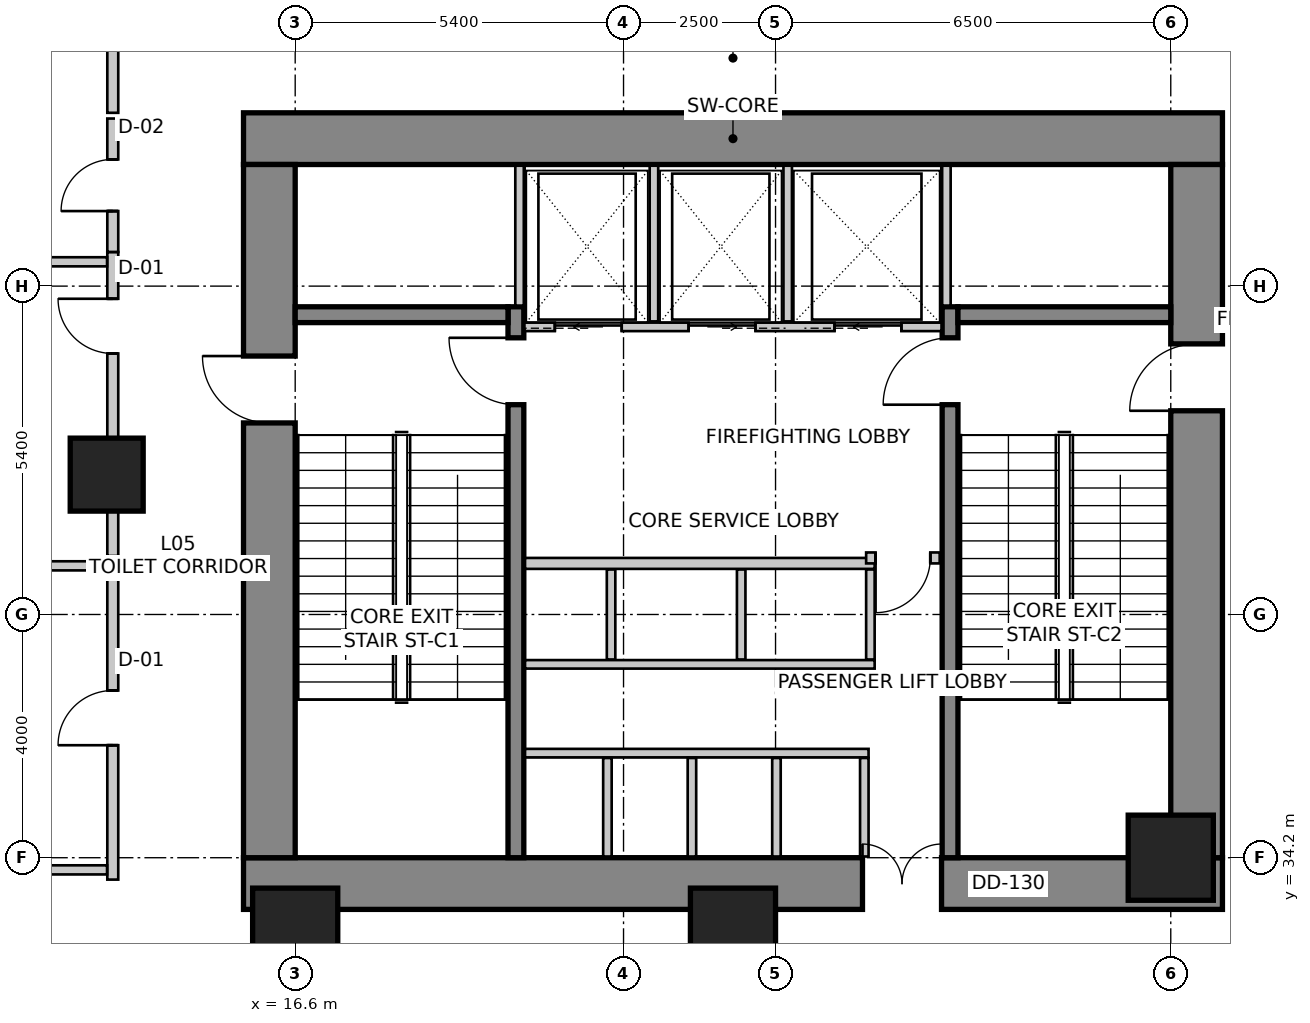
"""IFC4 building model, lengths in metres.
Left out: names, types, materials, properties, quantities, classifications, styles, units other than length and angle.
Written with IfcOpenShell. Run it as: python <this file> out.ifc"""

import sys

from ifc_helpers import new_model, si_unit, direction, frame, frame_2d, origin, origin_2d, place, context, subcontext, project, spatial, rectangle, extrude, source, transform, mapped, element, fill, save


model = new_model("IFC4")
c1 = context("Model", 3, precision=1e-05, world=origin(), true_north=direction((0.0, 1.0)))
c2 = subcontext(c1, "Body", "Model", "MODEL_VIEW")
j1 = project(units=[si_unit("LENGTHUNIT", "METRE"), si_unit("PLANEANGLEUNIT", "RADIAN")], contexts=[c1])
p1 = place(None, origin())
s1 = spatial("IfcSite", under=j1, at=p1, CompositionType="ELEMENT")
p2 = place(p1, origin())
s2 = spatial("IfcBuilding", under=s1, at=p2, CompositionType="ELEMENT")
p3 = place(p2, frame((0.0, 0.0, 21.6)))
s3 = spatial("IfcBuildingStorey", under=s2, at=p3, CompositionType="ELEMENT", Elevation=21.6)
p4 = place(p3, frame((15.75, 46.025, 0.0), z_axis=(0.0, 0.0, 1.0), x_axis=(1.0, 0.0, 0.0)))
e1 = element("IfcWall", 1, at=p4, inside=s3, PredefinedType="SHEAR", context=c2, shape_type="SweptSolid", body=[
    extrude(rectangle(XDim=16.1, YDim=0.85, at=frame_2d((8.05, 0.0))), origin(), (0.0, 0.0, 1.0), 5.4),
])
p5 = place(p3, frame((15.75, 33.775, 0.0), z_axis=(0.0, 0.0, 1.0), x_axis=(1.0, 0.0, 0.0)))
e2 = element("IfcWall", 2, at=p5, inside=s3, PredefinedType="SHEAR", context=c2, shape_type="SweptSolid", body=[
    extrude(rectangle(XDim=16.1, YDim=0.85, at=frame_2d((8.05, 0.0))), origin(), (0.0, 0.0, 1.0), 5.4),
])
m1 = source(origin(), c2, "Body", "SweptSolid", [
    extrude(rectangle(XDim=1.3, YDim=2.15, at=frame_2d((0.65, 1.075))), frame((0.0, 0.435, 0.0), z_axis=(0.0, -1.0, 0.0), x_axis=(1.0, 0.0, 0.0)), (0.0, 0.0, 1.0), 0.87),
])
p6 = place(p5, frame((10.18, 0.0, 0.0)))
e3 = element("IfcOpeningElement", 3, at=p6, cuts=e2, PredefinedType="OPENING", context=c2, shape_type="MappedRepresentation", body=[
    mapped(m1, transform((0.0, 0.0, 0.0), scale=1.0)),
])
p7 = place(p3, frame((16.175, 34.2, 0.0), z_axis=(0.0, 0.0, 1.0), x_axis=(0.0, 1.0, 0.0)))
e4 = element("IfcWall", 4, at=p7, inside=s3, PredefinedType="SHEAR", context=c2, shape_type="SweptSolid", body=[
    extrude(rectangle(XDim=11.4, YDim=0.85, at=frame_2d((5.7, 0.0))), origin(), (0.0, 0.0, 1.0), 5.4),
])
m2 = source(origin(), c2, "Body", "SweptSolid", [
    extrude(rectangle(XDim=1.1, YDim=2.15, at=frame_2d((0.55, 1.075))), frame((0.0, 0.435, 0.0), z_axis=(0.0, -1.0, 0.0), x_axis=(1.0, 0.0, 0.0)), (0.0, 0.0, 1.0), 0.87),
])
p8 = place(p7, frame((7.15, 0.0, 0.0)))
e5 = element("IfcOpeningElement", 5, at=p8, cuts=e4, PredefinedType="OPENING", context=c2, shape_type="MappedRepresentation", body=[
    mapped(m2, transform((0.0, 0.0, 0.0), scale=1.0)),
])
p9 = place(p3, frame((31.425, 34.2, 0.0), z_axis=(0.0, 0.0, 1.0), x_axis=(0.0, 1.0, 0.0)))
e6 = element("IfcWall", 6, at=p9, inside=s3, PredefinedType="SHEAR", context=c2, shape_type="SweptSolid", body=[
    extrude(rectangle(XDim=11.4, YDim=0.85, at=frame_2d((5.7, 0.0))), origin(), (0.0, 0.0, 1.0), 5.4),
])
p10 = place(p9, frame((7.35, 0.0, 0.0)))
e7 = element("IfcOpeningElement", 7, at=p10, cuts=e6, PredefinedType="OPENING", context=c2, shape_type="MappedRepresentation", body=[
    mapped(m2, transform((0.0, 0.0, 0.0), scale=1.0)),
])
p11 = place(p3, frame((20.23, 34.2, 0.0), z_axis=(0.0, 0.0, 1.0), x_axis=(0.0, 1.0, 0.0)))
e8 = element("IfcWall", 8, at=p11, inside=s3, PredefinedType="SHEAR", context=c2, shape_type="SweptSolid", body=[
    extrude(rectangle(XDim=9.06, YDim=0.26, at=frame_2d((4.53, 0.0))), origin(), (0.0, 0.0, 1.0), 5.4),
])
m3 = source(origin(), c2, "Body", "SweptSolid", [
    extrude(rectangle(XDim=1.1, YDim=2.15, at=frame_2d((0.55, 1.075))), frame((0.0, 0.14, 0.0), z_axis=(0.0, -1.0, 0.0), x_axis=(1.0, 0.0, 0.0)), (0.0, 0.0, 1.0), 0.28),
])
p12 = place(p11, frame((7.45, 0.0, 0.0)))
e9 = element("IfcOpeningElement", 9, at=p12, cuts=e8, PredefinedType="OPENING", context=c2, shape_type="MappedRepresentation", body=[
    mapped(m3, transform((0.0, 0.0, 0.0), scale=1.0)),
])
p13 = place(p3, frame((27.37, 34.2, 0.0), z_axis=(0.0, 0.0, 1.0), x_axis=(0.0, 1.0, 0.0)))
e10 = element("IfcWall", 10, at=p13, inside=s3, PredefinedType="SHEAR", context=c2, shape_type="SweptSolid", body=[
    extrude(rectangle(XDim=9.06, YDim=0.26, at=frame_2d((4.53, 0.0))), origin(), (0.0, 0.0, 1.0), 5.4),
])
p14 = place(p13, frame((7.45, 0.0, 0.0)))
e11 = element("IfcOpeningElement", 11, at=p14, cuts=e10, PredefinedType="OPENING", context=c2, shape_type="MappedRepresentation", body=[
    mapped(m3, transform((0.0, 0.0, 0.0), scale=1.0)),
])
for number, where, z_axis, x_axis in (
    (12, (16.6, 43.13, 0.0), (0.0, 0.0, 1.0), (1.0, 0.0, 0.0)),
    (13, (27.5, 43.13, 0.0), (0.0, 0.0, 1.0), (1.0, 0.0, 0.0)),
):
    element("IfcWall", number, at=place(p3, frame(where, z_axis=z_axis, x_axis=x_axis)), inside=s3, PredefinedType="SHEAR", context=c2, shape_type="SweptSolid", body=[
        extrude(rectangle(XDim=3.5, YDim=0.26, at=frame_2d((1.75, 0.0))), origin(), (0.0, 0.0, 1.0), 5.4),
    ])
m4 = source(origin(), c2, "Body", "SweptSolid", [
    extrude(rectangle(XDim=1.4, YDim=1.4, at=origin_2d()), origin(), (0.0, 0.0, 1.0), 5.4),
])
for number, where, z_axis, x_axis in (
    (14, (16.6, 33.0, 0.0), (0.0, 0.0, 1.0), (1.0, 0.0, 0.0)),
    (15, (23.8, 33.0, 0.0), (0.0, 0.0, 1.0), (1.0, 0.0, 0.0)),
    (16, (31.0, 34.2, 0.0), (0.0, 0.0, 1.0), (1.0, 0.0, 0.0)),
):
    element("IfcColumn", number, at=place(p3, frame(where, z_axis=z_axis, x_axis=x_axis)), inside=s3, PredefinedType="COLUMN", context=c2, shape_type="MappedRepresentation", body=[
        mapped(m4, transform((0.0, 0.0, 0.0), scale=1.0)),
    ])
m5 = source(origin(), c2, "Body", "SweptSolid", [
    extrude(rectangle(XDim=1.2, YDim=1.2, at=origin_2d()), origin(), (0.0, 0.0, 1.0), 5.4),
])
p15 = place(p3, frame((13.5, 40.5, 0.0), z_axis=(0.0, 0.0, 1.0), x_axis=(1.0, 0.0, 0.0)))
e17 = element("IfcColumn", 17, at=p15, inside=s3, PredefinedType="COLUMN", context=c2, shape_type="MappedRepresentation", body=[
    mapped(m5, transform((0.0, 0.0, 0.0), scale=1.0)),
])
p16 = place(p3, frame((20.37, 42.93, 0.0), z_axis=(0.0, 0.0, 1.0), x_axis=(1.0, 0.0, 0.0)))
e18 = element("IfcWall", 18, at=p16, inside=s3, PredefinedType="SOLIDWALL", context=c2, shape_type="SweptSolid", body=[
    extrude(rectangle(XDim=6.86, YDim=0.14, at=frame_2d((3.43, 0.0))), origin(), (0.0, 0.0, 1.0), 5.05),
])
m6 = source(origin(), c2, "Body", "SweptSolid", [
    extrude(rectangle(XDim=1.1, YDim=2.15, at=frame_2d((0.55, 1.075))), frame((0.0, 0.08, 0.0), z_axis=(0.0, -1.0, 0.0), x_axis=(1.0, 0.0, 0.0)), (0.0, 0.0, 1.0), 0.16),
])
p17 = place(p16, frame((0.5, 0.0, 0.0)))
e19 = element("IfcOpeningElement", 19, at=p17, cuts=e18, PredefinedType="OPENING", context=c2, shape_type="MappedRepresentation", body=[
    mapped(m6, transform((0.0, 0.0, 0.0), scale=1.0)),
])
p18 = place(p16, frame((2.7, 0.0, 0.0)))
e20 = element("IfcOpeningElement", 20, at=p18, cuts=e18, PredefinedType="OPENING", context=c2, shape_type="MappedRepresentation", body=[
    mapped(m6, transform((0.0, 0.0, 0.0), scale=1.0)),
])
p19 = place(p16, frame((5.1, 0.0, 0.0)))
e21 = element("IfcOpeningElement", 21, at=p19, cuts=e18, PredefinedType="OPENING", context=c2, shape_type="MappedRepresentation", body=[
    mapped(m6, transform((0.0, 0.0, 0.0), scale=1.0)),
])
for number, where, z_axis, x_axis in (
    (22, (20.29, 43.28, 0.0), (0.0, 0.0, 1.0), (0.0, 1.0, 0.0)),
    (23, (27.31, 43.28, 0.0), (0.0, 0.0, 1.0), (0.0, 1.0, 0.0)),
):
    element("IfcWall", number, at=place(p3, frame(where, z_axis=z_axis, x_axis=x_axis)), inside=s3, PredefinedType="SOLIDWALL", context=c2, shape_type="SweptSolid", body=[
        extrude(rectangle(XDim=2.3, YDim=0.14, at=frame_2d((1.15, 0.0))), origin(), (0.0, 0.0, 1.0), 5.05),
    ])
for number, where, z_axis, x_axis in (
    (24, (22.5, 43.02, 0.0), (0.0, 0.0, 1.0), (0.0, 1.0, 0.0)),
    (25, (24.7, 43.02, 0.0), (0.0, 0.0, 1.0), (0.0, 1.0, 0.0)),
):
    element("IfcWall", number, at=place(p3, frame(where, z_axis=z_axis, x_axis=x_axis)), inside=s3, PredefinedType="SOLIDWALL", context=c2, shape_type="SweptSolid", body=[
        extrude(rectangle(XDim=2.56, YDim=0.14, at=frame_2d((1.28, 0.0))), origin(), (0.0, 0.0, 1.0), 5.05),
    ])
p20 = place(p3, frame((20.38, 35.92, 0.0), z_axis=(0.0, 0.0, 1.0), x_axis=(1.0, 0.0, 0.0)))
e26 = element("IfcWall", 26, at=p20, inside=s3, PredefinedType="SOLIDWALL", context=c2, shape_type="SweptSolid", body=[
    extrude(rectangle(XDim=5.65, YDim=0.14, at=frame_2d((2.825, 0.0))), origin(), (0.0, 0.0, 1.0), 5.05),
])
for number, where, z_axis, x_axis in (
    (27, (25.96, 34.22, 0.0), (0.0, 0.0, 1.0), (0.0, 1.0, 0.0)),
    (28, (21.735, 34.22, 0.0), (0.0, 0.0, 1.0), (0.0, 1.0, 0.0)),
    (29, (23.125, 34.22, 0.0), (0.0, 0.0, 1.0), (0.0, 1.0, 0.0)),
    (30, (24.515, 34.22, 0.0), (0.0, 0.0, 1.0), (0.0, 1.0, 0.0)),
):
    element("IfcWall", number, at=place(p3, frame(where, z_axis=z_axis, x_axis=x_axis)), inside=s3, PredefinedType="SOLIDWALL", context=c2, shape_type="SweptSolid", body=[
        extrude(rectangle(XDim=1.62, YDim=0.14, at=frame_2d((0.81, 0.0))), origin(), (0.0, 0.0, 1.0), 5.05),
    ])
p21 = place(p3, frame((20.38, 37.38, 0.0), z_axis=(0.0, 0.0, 1.0), x_axis=(1.0, 0.0, 0.0)))
e31 = element("IfcWall", 31, at=p21, inside=s3, PredefinedType="SOLIDWALL", context=c2, shape_type="SweptSolid", body=[
    extrude(rectangle(XDim=5.75, YDim=0.14, at=frame_2d((2.875, 0.0))), origin(), (0.0, 0.0, 1.0), 5.05),
])
p22 = place(p3, frame((20.38, 39.04, 0.0), z_axis=(0.0, 0.0, 1.0), x_axis=(1.0, 0.0, 0.0)))
e32 = element("IfcWall", 32, at=p22, inside=s3, PredefinedType="SOLIDWALL", context=c2, shape_type="SweptSolid", body=[
    extrude(rectangle(XDim=5.75, YDim=0.18, at=frame_2d((2.875, 0.0))), origin(), (0.0, 0.0, 1.0), 5.05),
])
for number, where, z_axis, x_axis in (
    (33, (26.06, 37.46, 0.0), (0.0, 0.0, 1.0), (0.0, 1.0, 0.0)),
    (34, (21.795, 37.46, 0.0), (0.0, 0.0, 1.0), (0.0, 1.0, 0.0)),
    (35, (23.935, 37.46, 0.0), (0.0, 0.0, 1.0), (0.0, 1.0, 0.0)),
):
    element("IfcWall", number, at=place(p3, frame(where, z_axis=z_axis, x_axis=x_axis)), inside=s3, PredefinedType="SOLIDWALL", context=c2, shape_type="SweptSolid", body=[
        extrude(rectangle(XDim=1.48, YDim=0.14, at=frame_2d((0.74, 0.0))), origin(), (0.0, 0.0, 1.0), 5.05),
    ])
p23 = place(p3, frame((27.2, 39.13, 0.0), z_axis=(0.0, 0.0, 1.0), x_axis=(-1.0, 0.0, 0.0)))
e36 = element("IfcWall", 36, at=p23, inside=s3, PredefinedType="PARTITIONING", context=c2, shape_type="SweptSolid", body=[
    extrude(rectangle(XDim=1.21, YDim=0.18, at=frame_2d((0.605, 0.0))), origin(), (0.0, 0.0, 1.0), 5.05),
])
m7 = source(origin(), c2, "Body", "SweptSolid", [
    extrude(rectangle(XDim=0.9, YDim=2.15, at=frame_2d((0.45, 1.075))), frame((0.0, 0.1, 0.0), z_axis=(0.0, -1.0, 0.0), x_axis=(1.0, 0.0, 0.0)), (0.0, 0.0, 1.0), 0.2),
])
p24 = place(p23, frame((0.155, 0.0, 0.0)))
e37 = element("IfcOpeningElement", 37, at=p24, cuts=e36, PredefinedType="OPENING", context=c2, shape_type="MappedRepresentation", body=[
    mapped(m7, transform((0.0, 0.0, 0.0), scale=1.0)),
])
p25 = place(p3, frame((13.6, 46.45, 0.0), z_axis=(0.0, 0.0, 1.0), x_axis=(0.0, 1.0, 0.0)))
e38 = element("IfcWall", 38, at=p25, inside=s3, PredefinedType="PARTITIONING", context=c2, shape_type="SweptSolid", body=[
    extrude(rectangle(XDim=1.71, YDim=0.18, at=frame_2d((0.855, 0.0))), origin(), (0.0, 0.0, 1.0), 5.05),
])
p26 = place(p3, frame((13.6, 33.84, 0.0), z_axis=(0.0, 0.0, 1.0), x_axis=(0.0, 1.0, 0.0)))
e39 = element("IfcWall", 39, at=p26, inside=s3, PredefinedType="PARTITIONING", context=c2, shape_type="SweptSolid", body=[
    extrude(rectangle(XDim=5.32, YDim=0.18, at=frame_2d((2.66, 0.0))), origin(), (0.0, 0.0, 1.0), 5.05),
])
p27 = place(p26, frame((2.21, 0.0, 0.0)))
e40 = element("IfcOpeningElement", 40, at=p27, cuts=e39, PredefinedType="OPENING", context=c2, shape_type="MappedRepresentation", body=[
    mapped(m7, transform((0.0, 0.0, 0.0), scale=1.0)),
])
p28 = place(p3, frame((13.6, 39.162, 0.0), z_axis=(0.0, 0.0, 1.0), x_axis=(0.0, 1.0, 0.0)))
e41 = element("IfcWall", 41, at=p28, inside=s3, PredefinedType="PARTITIONING", context=c2, shape_type="SweptSolid", body=[
    extrude(rectangle(XDim=4.998, YDim=0.18, at=frame_2d((2.499, 0.0))), origin(), (0.0, 0.0, 1.0), 3.842),
])
p29 = place(p28, frame((3.33, 0.0, 0.0)))
e42 = element("IfcOpeningElement", 42, at=p29, cuts=e41, PredefinedType="OPENING", context=c2, shape_type="MappedRepresentation", body=[
    mapped(m7, transform((0.0, 0.0, 0.0), scale=1.0)),
])
p30 = place(p3, frame((13.6, 44.162, 0.0), z_axis=(0.0, 0.0, 1.0), x_axis=(0.0, 1.0, 0.0)))
e43 = element("IfcWall", 43, at=p30, inside=s3, PredefinedType="PARTITIONING", context=c2, shape_type="SweptSolid", body=[
    extrude(rectangle(XDim=2.194, YDim=0.18, at=frame_2d((1.097, 0.0))), origin(), (0.0, 0.0, 1.0), 5.05),
])
m8 = source(origin(), c2, "Body", "SweptSolid", [
    extrude(rectangle(XDim=0.85, YDim=2.15, at=frame_2d((0.425, 1.075))), frame((0.0, 0.1, 0.0), z_axis=(0.0, -1.0, 0.0), x_axis=(1.0, 0.0, 0.0)), (0.0, 0.0, 1.0), 0.2),
])
p31 = place(p30, frame((0.672, 0.0, 0.0)))
e44 = element("IfcOpeningElement", 44, at=p31, cuts=e43, PredefinedType="OPENING", context=c2, shape_type="MappedRepresentation", body=[
    mapped(m8, transform((0.0, 0.0, 0.0), scale=1.0)),
])
for number, where, z_axis, x_axis in (
    (45, (5.8, 39.0, 0.0), (0.0, 0.0, 1.0), (1.0, 0.0, 0.0)),
    (46, (13.506, 34.0, 0.0), (0.0, 0.0, 1.0), (-1.0, 0.0, 0.0)),
):
    element("IfcWall", number, at=place(p3, frame(where, z_axis=z_axis, x_axis=x_axis)), inside=s3, PredefinedType="PARTITIONING", context=c2, shape_type="SweptSolid", body=[
        extrude(rectangle(XDim=7.706, YDim=0.15, at=frame_2d((3.853, 0.0))), origin(), (0.0, 0.0, 1.0), 3.842),
    ])
p32 = place(p3, frame((8.64, 44.0, 0.0), z_axis=(0.0, 0.0, 1.0), x_axis=(1.0, 0.0, 0.0)))
e47 = element("IfcWall", 47, at=p32, inside=s3, PredefinedType="PARTITIONING", context=c2, shape_type="SweptSolid", body=[
    extrude(rectangle(XDim=4.866, YDim=0.15, at=frame_2d((2.433, 0.0))), origin(), (0.0, 0.0, 1.0), 5.05),
])
for number, where, z_axis, x_axis in (
    (48, (17.1, 33.362, 0.0), (0.0, 0.0, 1.0), (0.0, -1.0, 0.0)),
    (49, (16.1, 14.49, 0.0), (0.0, 0.0, 1.0), (0.0, 1.0, 0.0)),
):
    element("IfcWall", number, at=place(p3, frame(where, z_axis=z_axis, x_axis=x_axis)), inside=s3, PredefinedType="SOLIDWALL", context=c2, shape_type="SweptSolid", body=[
        extrude(rectangle(XDim=18.872, YDim=0.2, at=frame_2d((9.436, 0.0))), origin(), (0.0, 0.0, 1.0), 3.042),
    ])
p33 = place(p3, frame((24.3, 33.412, 0.0), z_axis=(0.0, 0.0, 1.0), x_axis=(0.0, -1.0, 0.0)))
e50 = element("IfcWall", 50, at=p33, inside=s3, PredefinedType="SOLIDWALL", context=c2, shape_type="SweptSolid", body=[
    extrude(rectangle(XDim=3.678, YDim=0.2, at=frame_2d((1.839, 0.0))), origin(), (0.0, 0.0, 1.0), 3.042),
])
p34 = place(p3, frame((23.3, 14.49, 0.0), z_axis=(0.0, 0.0, 1.0), x_axis=(0.0, 1.0, 0.0)))
e51 = element("IfcWall", 51, at=p34, inside=s3, PredefinedType="SOLIDWALL", context=c2, shape_type="SweptSolid", body=[
    extrude(rectangle(XDim=18.872, YDim=0.2, at=frame_2d((9.436, 0.0))), origin(), (0.0, 0.0, 1.0), 3.042),
])
m9 = source(origin(), c2, "Body", "SweptSolid", [
    extrude(rectangle(XDim=1.1, YDim=2.15, at=frame_2d((0.55, 1.075))), frame((0.0, 0.025, 0.0), z_axis=(0.0, -1.0, 0.0), x_axis=(1.0, 0.0, 0.0)), (0.0, 0.0, 1.0), 0.05),
])
p35 = place(p17, origin())
e52 = element("IfcDoor", 52, at=p35, inside=s3, OperationType="SLIDING_TO_LEFT", PredefinedType="DOOR", context=c2, shape_type="MappedRepresentation", body=[
    mapped(m9, transform((0.0, 0.0, 0.0), scale=1.0)),
])
fill(e19, e52)
p36 = place(p18, origin())
e53 = element("IfcDoor", 53, at=p36, inside=s3, OperationType="SLIDING_TO_RIGHT", PredefinedType="DOOR", context=c2, shape_type="MappedRepresentation", body=[
    mapped(m9, transform((0.0, 0.0, 0.0), scale=1.0)),
])
fill(e20, e53)
m10 = source(origin(), c2, "Body", "SweptSolid", [
    extrude(rectangle(XDim=1.1, YDim=2.15, at=frame_2d((0.55, 1.075))), frame((0.0, 0.025, 0.0), z_axis=(0.0, -1.0, 0.0), x_axis=(1.0, 0.0, 0.0)), (0.0, 0.0, 1.0), 0.05),
])
p37 = place(p19, origin())
e54 = element("IfcDoor", 54, at=p37, inside=s3, OperationType="SLIDING_TO_LEFT", PredefinedType="DOOR", context=c2, shape_type="MappedRepresentation", body=[
    mapped(m10, transform((0.0, 0.0, 0.0), scale=1.0)),
])
fill(e21, e54)
m11 = source(origin(), c2, "Body", "SweptSolid", [
    extrude(rectangle(XDim=1.1, YDim=2.15, at=frame_2d((0.55, 1.075))), frame((0.0, 0.025, 0.0), z_axis=(0.0, -1.0, 0.0), x_axis=(1.0, 0.0, 0.0)), (0.0, 0.0, 1.0), 0.05),
])
p38 = place(p12, origin())
e55 = element("IfcDoor", 55, at=p38, inside=s3, OperationType="SINGLE_SWING_RIGHT", PredefinedType="DOOR", context=c2, shape_type="MappedRepresentation", body=[
    mapped(m11, transform((0.0, 0.0, 0.0), scale=1.0)),
])
fill(e9, e55)
p39 = place(p14, origin())
e56 = element("IfcDoor", 56, at=p39, inside=s3, OperationType="SINGLE_SWING_LEFT", PredefinedType="DOOR", context=c2, shape_type="MappedRepresentation", body=[
    mapped(m11, transform((0.0, 0.0, 0.0), scale=1.0)),
])
fill(e11, e56)
p40 = place(p8, origin())
e57 = element("IfcDoor", 57, at=p40, inside=s3, OperationType="SINGLE_SWING_RIGHT", PredefinedType="DOOR", context=c2, shape_type="MappedRepresentation", body=[
    mapped(m11, transform((0.0, 0.0, 0.0), scale=1.0)),
])
fill(e5, e57)
p41 = place(p10, origin())
e58 = element("IfcDoor", 58, at=p41, inside=s3, OperationType="SINGLE_SWING_LEFT", PredefinedType="DOOR", context=c2, shape_type="MappedRepresentation", body=[
    mapped(m11, transform((0.0, 0.0, 0.0), scale=1.0)),
])
fill(e7, e58)
m12 = source(origin(), c2, "Body", "SweptSolid", [
    extrude(rectangle(XDim=1.3, YDim=2.15, at=frame_2d((0.65, 1.075))), frame((0.0, 0.025, 0.0), z_axis=(0.0, -1.0, 0.0), x_axis=(1.0, 0.0, 0.0)), (0.0, 0.0, 1.0), 0.05),
])
p42 = place(p6, origin())
e59 = element("IfcDoor", 59, at=p42, inside=s3, OperationType="DOUBLE_DOOR_SINGLE_SWING", PredefinedType="DOOR", context=c2, shape_type="MappedRepresentation", body=[
    mapped(m12, transform((0.0, 0.0, 0.0), scale=1.0)),
])
fill(e3, e59)
m13 = source(origin(), c2, "Body", "SweptSolid", [
    extrude(rectangle(XDim=0.9, YDim=2.15, at=frame_2d((0.45, 1.075))), frame((0.0, 0.025, 0.0), z_axis=(0.0, -1.0, 0.0), x_axis=(1.0, 0.0, 0.0)), (0.0, 0.0, 1.0), 0.05),
])
p43 = place(p24, origin())
e60 = element("IfcDoor", 60, at=p43, inside=s3, OperationType="SINGLE_SWING_RIGHT", PredefinedType="DOOR", context=c2, shape_type="MappedRepresentation", body=[
    mapped(m13, transform((0.0, 0.0, 0.0), scale=1.0)),
])
fill(e37, e60)
m14 = source(origin(), c2, "Body", "SweptSolid", [
    extrude(rectangle(XDim=0.9, YDim=2.15, at=frame_2d((0.45, 1.075))), frame((0.0, 0.025, 0.0), z_axis=(0.0, -1.0, 0.0), x_axis=(1.0, 0.0, 0.0)), (0.0, 0.0, 1.0), 0.05),
])
p44 = place(p27, origin())
e61 = element("IfcDoor", 61, at=p44, inside=s3, OperationType="SINGLE_SWING_LEFT", PredefinedType="DOOR", context=c2, shape_type="MappedRepresentation", body=[
    mapped(m14, transform((0.0, 0.0, 0.0), scale=1.0)),
])
fill(e40, e61)
p45 = place(p29, origin())
e62 = element("IfcDoor", 62, at=p45, inside=s3, OperationType="SINGLE_SWING_RIGHT", PredefinedType="DOOR", context=c2, shape_type="MappedRepresentation", body=[
    mapped(m14, transform((0.0, 0.0, 0.0), scale=1.0)),
])
fill(e42, e62)
m15 = source(origin(), c2, "Body", "SweptSolid", [
    extrude(rectangle(XDim=0.85, YDim=2.15, at=frame_2d((0.425, 1.075))), frame((0.0, 0.025, 0.0), z_axis=(0.0, -1.0, 0.0), x_axis=(1.0, 0.0, 0.0)), (0.0, 0.0, 1.0), 0.05),
])
p46 = place(p31, origin())
e63 = element("IfcDoor", 63, at=p46, inside=s3, OperationType="SINGLE_SWING_LEFT", PredefinedType="DOOR", context=c2, shape_type="MappedRepresentation", body=[
    mapped(m15, transform((0.0, 0.0, 0.0), scale=1.0)),
])
fill(e44, e63)
save(model, sys.argv[1])
